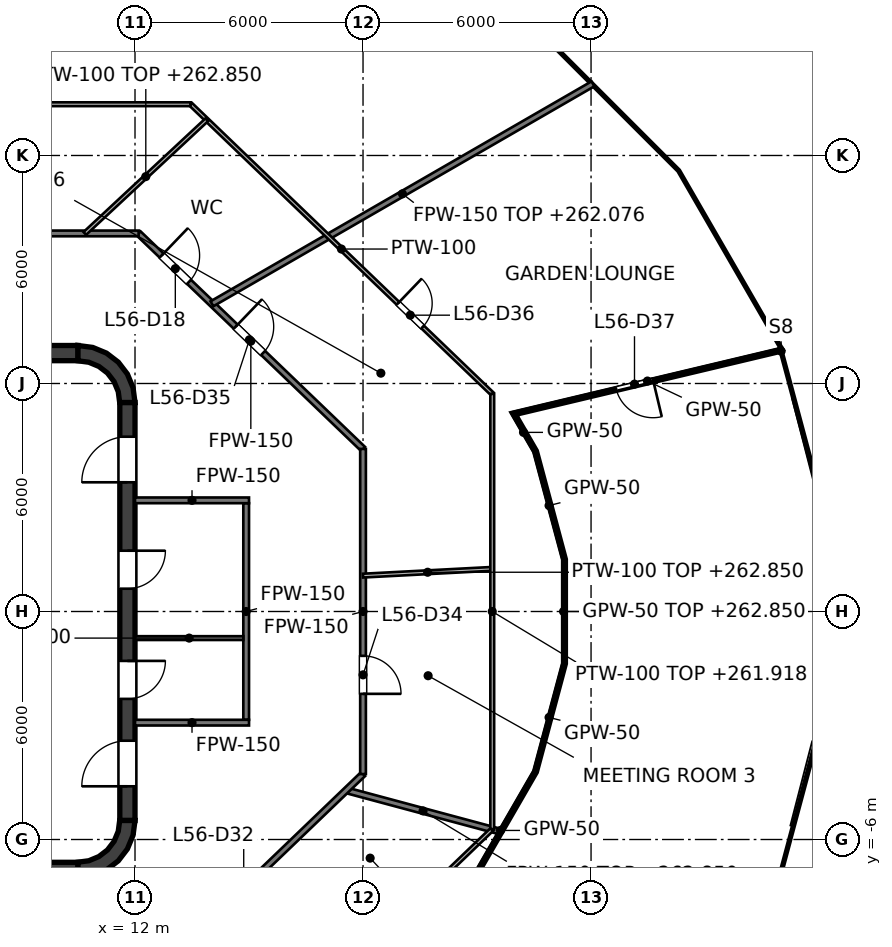
"""IFC4 building model, lengths in metres.
Left out: names, types, materials, properties, quantities, classifications, styles, units other than length and angle.
Written with IfcOpenShell. Run it as: python <this file> out.ifc"""

import sys

from ifc_helpers import new_model, si_unit, direction, frame, frame_2d, origin, place, context, subcontext, project, spatial, polyline, rectangle, outline, extrude, element, fill, save


model = new_model("IFC4")
c1 = context("Model", 3, precision=1e-05, world=origin(), true_north=direction((0.0, 1.0)))
c2 = subcontext(c1, "Body", "Model", "MODEL_VIEW")
j1 = project(units=[si_unit("LENGTHUNIT", "METRE"), si_unit("PLANEANGLEUNIT", "RADIAN")], contexts=[c1])
p1 = place(None, origin())
s1 = spatial("IfcSite", under=j1, at=p1, CompositionType="ELEMENT")
p2 = place(p1, origin())
s2 = spatial("IfcBuilding", under=s1, at=p2, CompositionType="ELEMENT")
p3 = place(p2, frame((0.0, 0.0, 259.0)))
s3 = spatial("IfcBuildingStorey", under=s2, at=p3, CompositionType="ELEMENT", Elevation=259.0)
for number, where, z_axis, x_axis in (
    (1, (-10.5, 6.8, 0.0), (0.0, 0.0, 1.0), (1.0, 0.0, 0.0)),
    (2, (-10.5, -6.8, 0.0), (0.0, 0.0, 1.0), (1.0, 0.0, 0.0)),
):
    element("IfcWall", number, at=place(p3, frame(where, z_axis=z_axis, x_axis=x_axis)), inside=s3, PredefinedType="SHEAR", context=c2, shape_type="SweptSolid", body=[
        extrude(rectangle(XDim=21.0, YDim=0.4, at=frame_2d((10.5, 0.0))), origin(), (0.0, 0.0, 1.0), 4.0),
    ])
p4 = place(p3, frame((11.8, -5.5, 0.0), z_axis=(0.0, 0.0, 1.0), x_axis=(0.0, 1.0, 0.0)))
e3 = element("IfcWall", 3, at=p4, inside=s3, PredefinedType="SHEAR", context=c2, shape_type="SweptSolid", body=[
    extrude(rectangle(XDim=11.0, YDim=0.4, at=frame_2d((5.5, 0.0))), origin(), (0.0, 0.0, 1.0), 4.0),
])
p5 = place(p4, frame((3.2, 0.0, 0.0)))
e4 = element("IfcOpeningElement", 4, at=p5, cuts=e3, PredefinedType="OPENING", context=c2, shape_type="SweptSolid", body=[
    extrude(rectangle(XDim=1.0, YDim=2.1, at=frame_2d((0.5, 1.05))), frame((0.0, 0.2, 0.0), z_axis=(0.0, -1.0, 0.0), x_axis=(1.0, 0.0, 0.0)), (0.0, 0.0, 1.0), 0.4),
])
p6 = place(p4, frame((6.1, 0.0, 0.0)))
e5 = element("IfcOpeningElement", 5, at=p6, cuts=e3, PredefinedType="OPENING", context=c2, shape_type="SweptSolid", body=[
    extrude(rectangle(XDim=1.0, YDim=2.1, at=frame_2d((0.5, 1.05))), frame((0.0, 0.2, 0.0), z_axis=(0.0, -1.0, 0.0), x_axis=(1.0, 0.0, 0.0)), (0.0, 0.0, 1.0), 0.4),
])
p7 = place(p4, frame((0.9, 0.0, 0.0)))
e6 = element("IfcOpeningElement", 6, at=p7, cuts=e3, PredefinedType="OPENING", context=c2, shape_type="SweptSolid", body=[
    extrude(rectangle(XDim=1.2, YDim=2.1, at=frame_2d((0.6, 1.05))), frame((0.0, 0.2, 0.0), z_axis=(0.0, -1.0, 0.0), x_axis=(1.0, 0.0, 0.0)), (0.0, 0.0, 1.0), 0.4),
])
p8 = place(p4, frame((8.9, 0.0, 0.0)))
e7 = element("IfcOpeningElement", 7, at=p8, cuts=e3, PredefinedType="OPENING", context=c2, shape_type="SweptSolid", body=[
    extrude(rectangle(XDim=1.2, YDim=2.1, at=frame_2d((0.6, 1.05))), frame((0.0, 0.2, 0.0), z_axis=(0.0, -1.0, 0.0), x_axis=(1.0, 0.0, 0.0)), (0.0, 0.0, 1.0), 0.4),
])
p9 = place(p3, origin())
e8 = element("IfcWall", 8, at=p9, inside=s3, PredefinedType="SHEAR", context=c2, shape_type="SweptSolid", body=[
    extrude(outline(polyline([(10.5, 7.0), (10.5, 6.596), (10.784, 6.559), (11.048, 6.45), (11.275, 6.275), (11.45, 6.048), (11.559, 5.784), (11.596, 5.5), (12.0, 5.5), (11.949, 5.888), (11.799, 6.25), (11.561, 6.561), (11.25, 6.799), (10.888, 6.949), (10.5, 7.0)])), origin(), (0.0, 0.0, 1.0), 4.0),
])
e9 = element("IfcWall", 9, at=p9, inside=s3, PredefinedType="SHEAR", context=c2, shape_type="SweptSolid", body=[
    extrude(outline(polyline([(12.0, -5.5), (11.596, -5.5), (11.559, -5.784), (11.45, -6.048), (11.275, -6.275), (11.048, -6.45), (10.784, -6.559), (10.5, -6.596), (10.5, -7.0), (10.888, -6.949), (11.25, -6.799), (11.561, -6.561), (11.799, -6.25), (11.949, -5.888), (12.0, -5.5)])), origin(), (0.0, 0.0, 1.0), 4.0),
])
p10 = place(p3, frame((14.925, -2.85, 0.0), z_axis=(0.0, 0.0, 1.0), x_axis=(0.0, 1.0, 0.0)))
e10 = element("IfcWall", 10, at=p10, inside=s3, PredefinedType="PARTITIONING", context=c2, shape_type="SweptSolid", body=[
    extrude(rectangle(XDim=5.7, YDim=0.15, at=frame_2d((2.85, 0.0))), origin(), (0.0, 0.0, 1.0), 2.918),
])
for number, where, z_axis, x_axis in (
    (11, (12.0, 2.925, 0.0), (0.0, 0.0, 1.0), (1.0, 0.0, 0.0)),
    (12, (12.0, -2.925, 0.0), (0.0, 0.0, 1.0), (1.0, 0.0, 0.0)),
):
    element("IfcWall", number, at=place(p3, frame(where, z_axis=z_axis, x_axis=x_axis)), inside=s3, PredefinedType="PARTITIONING", context=c2, shape_type="SweptSolid", body=[
        extrude(rectangle(XDim=3.0, YDim=0.15, at=frame_2d((1.5, 0.0))), origin(), (0.0, 0.0, 1.0), 2.918),
    ])
p11 = place(p3, frame((12.0, -0.7, 0.0), z_axis=(0.0, 0.0, 1.0), x_axis=(1.0, 0.0, 0.0)))
e13 = element("IfcWall", 13, at=p11, inside=s3, PredefinedType="PARTITIONING", context=c2, shape_type="SweptSolid", body=[
    extrude(rectangle(XDim=2.85, YDim=0.1, at=frame_2d((1.425, 0.0))), origin(), (0.0, 0.0, 1.0), 2.918),
])
p12 = place(p3, frame((12.095, 9.949, 0.0), z_axis=(0.0, 0.0, 1.0), x_axis=(0.721290181137, -0.692633001376, 0.0)))
e14 = element("IfcWall", 14, at=p12, inside=s3, PredefinedType="PARTITIONING", context=c2, shape_type="SweptSolid", body=[
    extrude(rectangle(XDim=8.187, YDim=0.15, at=frame_2d((4.094, 0.0))), origin(), (0.0, 0.0, 1.0), 2.918),
])
p13 = place(p12, frame((0.839, 0.0, 0.0)))
e15 = element("IfcOpeningElement", 15, at=p13, cuts=e14, PredefinedType="OPENING", context=c2, shape_type="SweptSolid", body=[
    extrude(rectangle(XDim=1.0, YDim=2.1, at=frame_2d((0.5, 1.05))), frame((0.0, 0.075, 0.0), z_axis=(0.0, -1.0, 0.0), x_axis=(1.0, 0.0, 0.0)), (0.0, 0.0, 1.0), 0.15),
])
p14 = place(p12, frame((3.542, 0.0, 0.0)))
e16 = element("IfcOpeningElement", 16, at=p14, cuts=e14, PredefinedType="OPENING", context=c2, shape_type="SweptSolid", body=[
    extrude(rectangle(XDim=1.0, YDim=2.1, at=frame_2d((0.5, 1.05))), frame((0.0, 0.075, 0.0), z_axis=(0.0, -1.0, 0.0), x_axis=(1.0, 0.0, 0.0)), (0.0, 0.0, 1.0), 0.15),
])
p15 = place(p3, frame((17.556, -4.704, 0.0), z_axis=(0.0, 0.0, 1.0), x_axis=(0.965793364166, -0.259312895424, 0.0)))
e17 = element("IfcWall", 17, at=p15, inside=s3, PredefinedType="PARTITIONING", context=c2, shape_type="SweptSolid", body=[
    extrude(rectangle(XDim=4.189, YDim=0.15, at=frame_2d((2.094, 0.0))), origin(), (0.0, 0.0, 1.0), 3.85),
])
p16 = place(p3, frame((-12.095, 9.949, 0.0), z_axis=(0.0, 0.0, 1.0), x_axis=(1.0, 0.0, 0.0)))
e18 = element("IfcWall", 18, at=p16, inside=s3, PredefinedType="PARTITIONING", context=c2, shape_type="SweptSolid", body=[
    extrude(rectangle(XDim=24.19, YDim=0.15, at=frame_2d((12.095, 0.0))), origin(), (0.0, 0.0, 1.0), 2.927),
])
p17 = place(p16, frame((16.933, 0.0, 0.0)))
e19 = element("IfcOpeningElement", 19, at=p17, cuts=e18, PredefinedType="OPENING", context=c2, shape_type="SweptSolid", body=[
    extrude(rectangle(XDim=1.0, YDim=2.1, at=frame_2d((0.5, 1.05))), frame((0.0, 0.075, 0.0), z_axis=(0.0, -1.0, 0.0), x_axis=(1.0, 0.0, 0.0)), (0.0, 0.0, 1.0), 0.15),
])
p18 = place(p16, frame((10.255, 0.0, 0.0)))
e20 = element("IfcOpeningElement", 20, at=p18, cuts=e18, PredefinedType="OPENING", context=c2, shape_type="SweptSolid", body=[
    extrude(rectangle(XDim=1.0, YDim=2.1, at=frame_2d((0.5, 1.05))), frame((0.0, 0.075, 0.0), z_axis=(0.0, -1.0, 0.0), x_axis=(1.0, 0.0, 0.0)), (0.0, 0.0, 1.0), 0.15),
])
p19 = place(p16, frame((6.978, 0.0, 0.0)))
e21 = element("IfcOpeningElement", 21, at=p19, cuts=e18, PredefinedType="OPENING", context=c2, shape_type="SweptSolid", body=[
    extrude(rectangle(XDim=1.0, YDim=2.1, at=frame_2d((0.5, 1.05))), frame((0.0, 0.075, 0.0), z_axis=(0.0, -1.0, 0.0), x_axis=(1.0, 0.0, 0.0)), (0.0, 0.0, 1.0), 0.15),
])
p20 = place(p16, frame((2.317, 0.0, 0.0)))
e22 = element("IfcOpeningElement", 22, at=p20, cuts=e18, PredefinedType="OPENING", context=c2, shape_type="SweptSolid", body=[
    extrude(rectangle(XDim=1.0, YDim=2.1, at=frame_2d((0.5, 1.05))), frame((0.0, 0.075, 0.0), z_axis=(0.0, -1.0, 0.0), x_axis=(1.0, 0.0, 0.0)), (0.0, 0.0, 1.0), 0.15),
])
p21 = place(p3, frame((14.024, 8.097, 0.0), z_axis=(0.0, 0.0, 1.0), x_axis=(0.866020528885, 0.500008443478, 0.0)))
e23 = element("IfcWall", 23, at=p21, inside=s3, PredefinedType="PARTITIONING", context=c2, shape_type="SweptSolid", body=[
    extrude(rectangle(XDim=11.577, YDim=0.15, at=frame_2d((5.789, 0.0))), origin(), (0.0, 0.0, 1.0), 3.076),
])
p22 = place(p3, frame((12.095, -9.949, 0.0), z_axis=(0.0, 0.0, 1.0), x_axis=(0.721348586031, 0.692572174889, 0.0)))
e24 = element("IfcWall", 24, at=p22, inside=s3, PredefinedType="PARTITIONING", context=c2, shape_type="SweptSolid", body=[
    extrude(rectangle(XDim=8.187, YDim=0.15, at=frame_2d((4.094, 0.0))), origin(), (0.0, 0.0, 1.0), 2.918),
])
p23 = place(p22, frame((3.334, 0.0, 0.0)))
e25 = element("IfcOpeningElement", 25, at=p23, cuts=e24, PredefinedType="OPENING", context=c2, shape_type="SweptSolid", body=[
    extrude(rectangle(XDim=1.0, YDim=2.1, at=frame_2d((0.5, 1.05))), frame((0.0, 0.075, 0.0), z_axis=(0.0, -1.0, 0.0), x_axis=(1.0, 0.0, 0.0)), (0.0, 0.0, 1.0), 0.15),
])
p24 = place(p3, frame((18.0, -4.278, 0.0), z_axis=(0.0, 0.0, 1.0), x_axis=(0.0, 1.0, 0.0)))
e26 = element("IfcWall", 26, at=p24, inside=s3, PredefinedType="PARTITIONING", context=c2, shape_type="SweptSolid", body=[
    extrude(rectangle(XDim=8.556, YDim=0.15, at=frame_2d((4.278, 0.0))), origin(), (0.0, 0.0, 1.0), 2.918),
])
p25 = place(p24, frame((2.111, 0.0, 0.0)))
e27 = element("IfcOpeningElement", 27, at=p25, cuts=e26, PredefinedType="OPENING", context=c2, shape_type="SweptSolid", body=[
    extrude(rectangle(XDim=1.0, YDim=2.1, at=frame_2d((0.5, 1.05))), frame((0.0, 0.075, 0.0), z_axis=(0.0, -1.0, 0.0), x_axis=(1.0, 0.0, 0.0)), (0.0, 0.0, 1.0), 0.15),
])
p26 = place(p3, frame((22.514, 4.208, 0.0), z_axis=(0.0, 0.0, 1.0), x_axis=(0.259041696442, -0.965866139537, 0.0)))
e28 = element("IfcWall", 28, at=p26, inside=s3, PredefinedType="PARTITIONING", context=c2, shape_type="SweptSolid", body=[
    extrude(rectangle(XDim=2.941, YDim=0.05, at=frame_2d((1.471, 0.0))), origin(), (0.0, 0.0, 1.0), 2.918),
])
p27 = place(p3, frame((21.931, 5.219, 0.0), z_axis=(0.0, 0.0, 1.0), x_axis=(0.499559453058, -0.86627960432, 0.0)))
e29 = element("IfcWall", 29, at=p27, inside=s3, PredefinedType="PARTITIONING", context=c2, shape_type="SweptSolid", body=[
    extrude(rectangle(XDim=1.167, YDim=0.05, at=frame_2d((0.583, 0.0))), origin(), (0.0, 0.0, 1.0), 2.918),
])
p28 = place(p3, frame((21.931, 5.219, 0.0), z_axis=(0.0, 0.0, 1.0), x_axis=(0.972838122094, 0.231486475199, 0.0)))
e30 = element("IfcWall", 30, at=p28, inside=s3, PredefinedType="PARTITIONING", context=c2, shape_type="SweptSolid", body=[
    extrude(rectangle(XDim=7.305, YDim=0.05, at=frame_2d((3.652, 0.0))), origin(), (0.0, 0.0, 1.0), 2.918),
])
p29 = place(p28, frame((2.802, 0.0, 0.0)))
e31 = element("IfcOpeningElement", 31, at=p29, cuts=e30, PredefinedType="OPENING", context=c2, shape_type="SweptSolid", body=[
    extrude(rectangle(XDim=1.0, YDim=2.1, at=frame_2d((0.5, 1.05))), frame((0.0, 0.025, 0.0), z_axis=(0.0, -1.0, 0.0), x_axis=(1.0, 0.0, 0.0)), (0.0, 0.0, 1.0), 0.05),
])
p30 = place(p3, frame((20.72, -7.315, 0.0), z_axis=(0.0, 0.0, 1.0), x_axis=(0.500032687935, 0.866006530574, 0.0)))
e32 = element("IfcWall", 32, at=p30, inside=s3, PredefinedType="PARTITIONING", context=c2, shape_type="SweptSolid", body=[
    extrude(rectangle(XDim=3.588, YDim=0.05, at=frame_2d((1.794, 0.0))), origin(), (0.0, 0.0, 1.0), 2.918),
])
p31 = place(p3, frame((22.514, -4.208, 0.0), z_axis=(0.0, 0.0, 1.0), x_axis=(0.259041696442, 0.965866139537, 0.0)))
e33 = element("IfcWall", 33, at=p31, inside=s3, PredefinedType="PARTITIONING", context=c2, shape_type="SweptSolid", body=[
    extrude(rectangle(XDim=2.941, YDim=0.05, at=frame_2d((1.471, 0.0))), origin(), (0.0, 0.0, 1.0), 2.918),
])
p32 = place(p3, frame((23.276, -1.367, 0.0), z_axis=(0.0, 0.0, 1.0), x_axis=(0.0, 1.0, 0.0)))
e34 = element("IfcWall", 34, at=p32, inside=s3, PredefinedType="PARTITIONING", context=c2, shape_type="SweptSolid", body=[
    extrude(rectangle(XDim=2.734, YDim=0.05, at=frame_2d((1.367, 0.0))), origin(), (0.0, 0.0, 1.0), 3.85),
])
p33 = place(p3, frame((13.463, 13.349, 0.0), z_axis=(0.0, 0.0, 1.0), x_axis=(0.721293766873, -0.692629267264, 0.0)))
e35 = element("IfcWall", 35, at=p33, inside=s3, PredefinedType="PARTITIONING", context=c2, shape_type="SweptSolid", body=[
    extrude(rectangle(XDim=11.004, YDim=0.1, at=frame_2d((5.502, 0.0))), origin(), (0.0, 0.0, 1.0), 2.927),
])
p34 = place(p33, frame((7.565, 0.0, 0.0)))
e36 = element("IfcOpeningElement", 36, at=p34, cuts=e35, PredefinedType="OPENING", context=c2, shape_type="SweptSolid", body=[
    extrude(rectangle(XDim=0.9, YDim=2.1, at=frame_2d((0.45, 1.05))), frame((0.0, 0.05, 0.0), z_axis=(0.0, -1.0, 0.0), x_axis=(1.0, 0.0, 0.0)), (0.0, 0.0, 1.0), 0.1),
])
p35 = place(p3, frame((-13.463, 13.349, 0.0), z_axis=(0.0, 0.0, 1.0), x_axis=(1.0, 0.0, 0.0)))
e37 = element("IfcWall", 37, at=p35, inside=s3, PredefinedType="PARTITIONING", context=c2, shape_type="SweptSolid", body=[
    extrude(rectangle(XDim=26.926, YDim=0.1, at=frame_2d((13.463, 0.0))), origin(), (0.0, 0.0, 1.0), 2.927),
])
p36 = place(p35, frame((19.31, 0.0, 0.0)))
e38 = element("IfcOpeningElement", 38, at=p36, cuts=e37, PredefinedType="OPENING", context=c2, shape_type="SweptSolid", body=[
    extrude(rectangle(XDim=1.8, YDim=2.1, at=frame_2d((0.9, 1.05))), frame((0.0, 0.05, 0.0), z_axis=(0.0, -1.0, 0.0), x_axis=(1.0, 0.0, 0.0)), (0.0, 0.0, 1.0), 0.1),
])
p37 = place(p3, frame((18.0, 0.944, 0.0), z_axis=(0.0, 0.0, 1.0), x_axis=(0.998632646467, 0.052276547413, 0.0)))
e39 = element("IfcWall", 39, at=p37, inside=s3, PredefinedType="PARTITIONING", context=c2, shape_type="SweptSolid", body=[
    extrude(rectangle(XDim=3.405, YDim=0.1, at=frame_2d((1.702, 0.0))), origin(), (0.0, 0.0, 1.0), 3.85),
])
p38 = place(p3, frame((10.679, 9.949, 0.0), z_axis=(0.0, 0.0, 1.0), x_axis=(0.731623098171, 0.681709353187, 0.0)))
e40 = element("IfcWall", 40, at=p38, inside=s3, PredefinedType="PARTITIONING", context=c2, shape_type="SweptSolid", body=[
    extrude(rectangle(XDim=4.387, YDim=0.1, at=frame_2d((2.194, 0.0))), origin(), (0.0, 0.0, 1.0), 3.85),
])
p39 = place(p3, frame((13.463, -13.349, 0.0), z_axis=(0.0, 0.0, 1.0), x_axis=(0.721271070112, 0.692652902556, 0.0)))
e41 = element("IfcWall", 41, at=p39, inside=s3, PredefinedType="PARTITIONING", context=c2, shape_type="SweptSolid", body=[
    extrude(rectangle(XDim=10.996, YDim=0.1, at=frame_2d((5.498, 0.0))), origin(), (0.0, 0.0, 1.0), 2.927),
])
p40 = place(p39, frame((4.547, 0.0, 0.0)))
e42 = element("IfcOpeningElement", 42, at=p40, cuts=e41, PredefinedType="OPENING", context=c2, shape_type="SweptSolid", body=[
    extrude(rectangle(XDim=1.8, YDim=2.1, at=frame_2d((0.9, 1.05))), frame((0.0, 0.05, 0.0), z_axis=(0.0, -1.0, 0.0), x_axis=(1.0, 0.0, 0.0)), (0.0, 0.0, 1.0), 0.1),
])
p41 = place(p3, frame((21.4, -5.727, 0.0), z_axis=(0.0, 0.0, 1.0), x_axis=(0.0, 1.0, 0.0)))
e43 = element("IfcWall", 43, at=p41, inside=s3, PredefinedType="PARTITIONING", context=c2, shape_type="SweptSolid", body=[
    extrude(rectangle(XDim=11.454, YDim=0.1, at=frame_2d((5.727, 0.0))), origin(), (0.0, 0.0, 1.0), 2.918),
])
p42 = place(p5, origin())
e44 = element("IfcDoor", 44, at=p42, inside=s3, OperationType="SINGLE_SWING_RIGHT", PredefinedType="DOOR", context=c2, shape_type="SweptSolid", body=[
    extrude(rectangle(XDim=1.0, YDim=2.1, at=frame_2d((0.5, 1.05))), frame((0.0, 0.025, 0.0), z_axis=(0.0, -1.0, 0.0), x_axis=(1.0, 0.0, 0.0)), (0.0, 0.0, 1.0), 0.05),
])
fill(e4, e44)
p43 = place(p6, origin())
e45 = element("IfcDoor", 45, at=p43, inside=s3, OperationType="SINGLE_SWING_RIGHT", PredefinedType="DOOR", context=c2, shape_type="SweptSolid", body=[
    extrude(rectangle(XDim=1.0, YDim=2.1, at=frame_2d((0.5, 1.05))), frame((0.0, 0.025, 0.0), z_axis=(0.0, -1.0, 0.0), x_axis=(1.0, 0.0, 0.0)), (0.0, 0.0, 1.0), 0.05),
])
fill(e5, e45)
p44 = place(p7, origin())
e46 = element("IfcDoor", 46, at=p44, inside=s3, OperationType="SINGLE_SWING_LEFT", PredefinedType="DOOR", context=c2, shape_type="SweptSolid", body=[
    extrude(rectangle(XDim=1.2, YDim=2.1, at=frame_2d((0.6, 1.05))), frame((0.0, 0.025, 0.0), z_axis=(0.0, -1.0, 0.0), x_axis=(1.0, 0.0, 0.0)), (0.0, 0.0, 1.0), 0.05),
])
fill(e6, e46)
p45 = place(p8, origin())
e47 = element("IfcDoor", 47, at=p45, inside=s3, OperationType="SINGLE_SWING_LEFT", PredefinedType="DOOR", context=c2, shape_type="SweptSolid", body=[
    extrude(rectangle(XDim=1.2, YDim=2.1, at=frame_2d((0.6, 1.05))), frame((0.0, 0.025, 0.0), z_axis=(0.0, -1.0, 0.0), x_axis=(1.0, 0.0, 0.0)), (0.0, 0.0, 1.0), 0.05),
])
fill(e7, e47)
p46 = place(p13, origin())
e48 = element("IfcDoor", 48, at=p46, inside=s3, OperationType="SINGLE_SWING_LEFT", PredefinedType="DOOR", context=c2, shape_type="SweptSolid", body=[
    extrude(rectangle(XDim=1.0, YDim=2.1, at=frame_2d((0.5, 1.05))), frame((0.0, 0.025, 0.0), z_axis=(0.0, -1.0, 0.0), x_axis=(1.0, 0.0, 0.0)), (0.0, 0.0, 1.0), 0.05),
])
fill(e15, e48)
p47 = place(p25, origin())
e49 = element("IfcDoor", 49, at=p47, inside=s3, OperationType="SINGLE_SWING_LEFT", PredefinedType="DOOR", context=c2, shape_type="SweptSolid", body=[
    extrude(rectangle(XDim=1.0, YDim=2.1, at=frame_2d((0.5, 1.05))), frame((0.0, 0.025, 0.0), z_axis=(0.0, -1.0, 0.0), x_axis=(1.0, 0.0, 0.0)), (0.0, 0.0, 1.0), 0.05),
])
fill(e27, e49)
p48 = place(p14, origin())
e50 = element("IfcDoor", 50, at=p48, inside=s3, OperationType="SINGLE_SWING_LEFT", PredefinedType="DOOR", context=c2, shape_type="SweptSolid", body=[
    extrude(rectangle(XDim=1.0, YDim=2.1, at=frame_2d((0.5, 1.05))), frame((0.0, 0.025, 0.0), z_axis=(0.0, -1.0, 0.0), x_axis=(1.0, 0.0, 0.0)), (0.0, 0.0, 1.0), 0.05),
])
fill(e16, e50)
p49 = place(p34, origin())
e51 = element("IfcDoor", 51, at=p49, inside=s3, OperationType="SINGLE_SWING_LEFT", PredefinedType="DOOR", context=c2, shape_type="SweptSolid", body=[
    extrude(rectangle(XDim=0.9, YDim=2.1, at=frame_2d((0.45, 1.05))), frame((0.0, 0.025, 0.0), z_axis=(0.0, -1.0, 0.0), x_axis=(1.0, 0.0, 0.0)), (0.0, 0.0, 1.0), 0.05),
])
fill(e36, e51)
p50 = place(p29, origin())
e52 = element("IfcDoor", 52, at=p50, inside=s3, OperationType="SINGLE_SWING_RIGHT", PredefinedType="DOOR", context=c2, shape_type="SweptSolid", body=[
    extrude(rectangle(XDim=1.0, YDim=2.1, at=frame_2d((0.5, 1.05))), frame((0.0, 0.025, 0.0), z_axis=(0.0, -1.0, 0.0), x_axis=(1.0, 0.0, 0.0)), (0.0, 0.0, 1.0), 0.05),
])
fill(e31, e52)
save(model, sys.argv[1])
